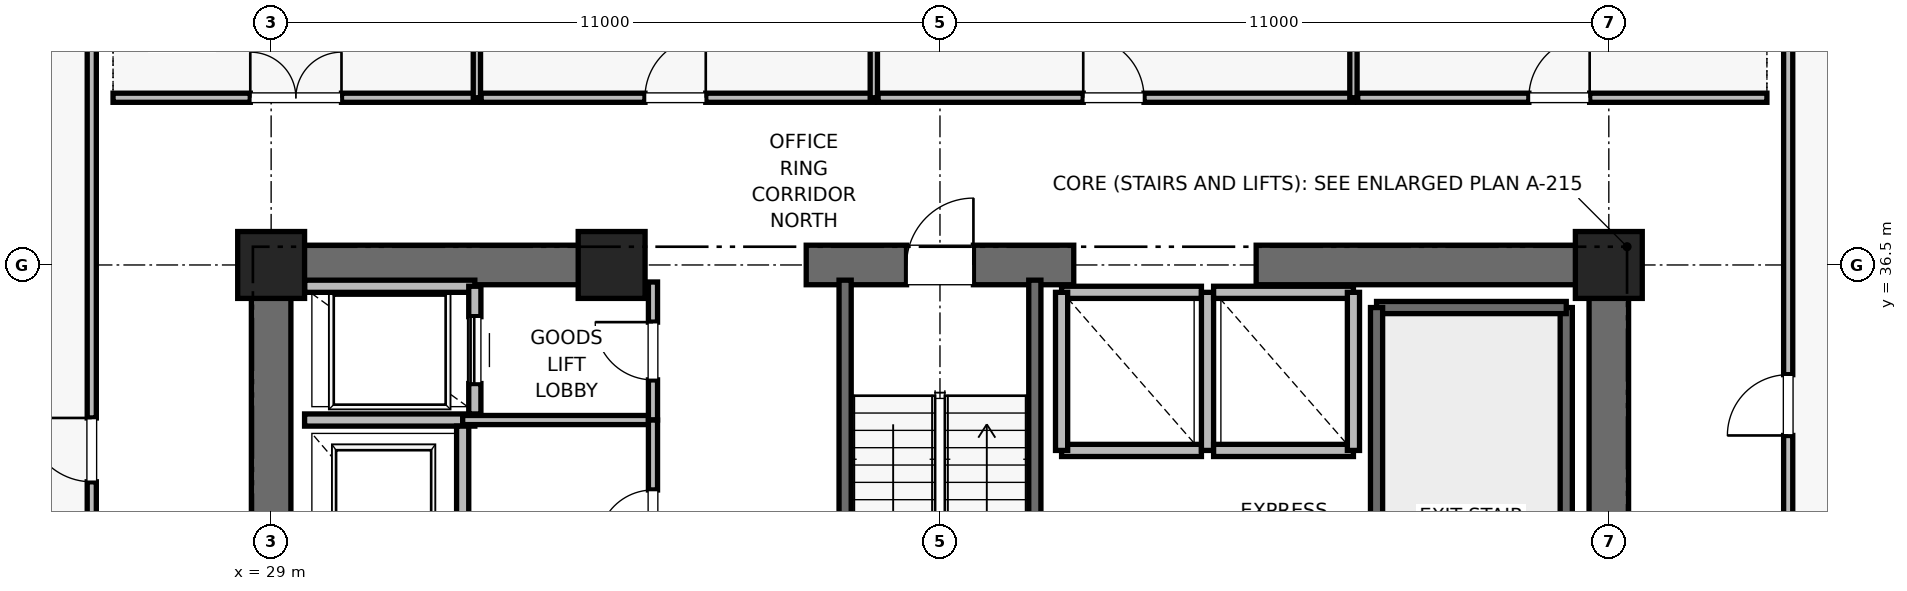
"""IFC4 building model, lengths in metres.
Left out: names, types, materials, properties, quantities, classifications, styles, units other than length and angle.
Written with IfcOpenShell. Run it as: python <this file> out.ifc"""

import sys

from ifc_helpers import new_model, si_unit, direction, frame, frame_2d, origin, origin_2d, place, context, subcontext, project, spatial, rectangle, extrude, element, fill, save


model = new_model("IFC4")
c1 = context("Model", 3, precision=1e-05, world=origin(), true_north=direction((0.0, 1.0)))
c2 = subcontext(c1, "Body", "Model", "MODEL_VIEW")
j1 = project(units=[si_unit("LENGTHUNIT", "METRE"), si_unit("PLANEANGLEUNIT", "RADIAN")], contexts=[c1])
p1 = place(None, origin())
s1 = spatial("IfcSite", under=j1, at=p1, CompositionType="ELEMENT")
p2 = place(p1, origin())
s2 = spatial("IfcBuilding", under=s1, at=p2, CompositionType="ELEMENT")
p3 = place(p2, frame((0.0, 0.0, 55.6)))
s3 = spatial("IfcBuildingStorey", under=s2, at=p3, CompositionType="ELEMENT", Elevation=55.6)
for number, where, z_axis, x_axis in (
    (1, (29.0, 36.5, 0.0), (0.0, 0.0, 1.0), (1.0, 0.0, 0.0)),
    (2, (51.0, 36.5, 0.0), (0.0, 0.0, 1.0), (1.0, 0.0, 0.0)),
    (3, (34.6, 36.5, 0.0), (0.0, 0.0, 1.0), (1.0, 0.0, 0.0)),
):
    element("IfcColumn", number, at=place(p3, frame(where, z_axis=z_axis, x_axis=x_axis)), inside=s3, PredefinedType="PILASTER", context=c2, shape_type="SweptSolid", body=[
        extrude(rectangle(XDim=1.1, YDim=1.1, at=origin_2d()), origin(), (0.0, 0.0, 1.0), 4.0),
    ])
p4 = place(p3, frame((29.0, 36.5, 0.0), z_axis=(0.0, 0.0, 1.0), x_axis=(1.0, 0.0, 0.0)))
e4 = element("IfcWall", 4, at=p4, inside=s3, PredefinedType="SHEAR", context=c2, shape_type="SweptSolid", body=[
    extrude(rectangle(XDim=5.8, YDim=0.65, at=frame_2d((2.9, 0.0))), origin(), (0.0, 0.0, 1.0), 3.76),
])
p5 = place(p3, frame((37.8, 36.5, 0.0), z_axis=(0.0, 0.0, 1.0), x_axis=(1.0, 0.0, 0.0)))
e5 = element("IfcWall", 5, at=p5, inside=s3, PredefinedType="SHEAR", context=c2, shape_type="SweptSolid", body=[
    extrude(rectangle(XDim=4.4, YDim=0.65, at=frame_2d((2.2, 0.0))), origin(), (0.0, 0.0, 1.0), 3.76),
])
p6 = place(p5, frame((1.65, 0.0, 0.0)))
e6 = element("IfcOpeningElement", 6, at=p6, cuts=e5, PredefinedType="OPENING", context=c2, shape_type="SweptSolid", body=[
    extrude(rectangle(XDim=1.1, YDim=2.15, at=frame_2d((0.55, 1.075))), frame((0.0, 0.325, 0.0), z_axis=(0.0, -1.0, 0.0), x_axis=(1.0, 0.0, 0.0)), (0.0, 0.0, 1.0), 0.65),
])
for number, where, z_axis, x_axis in (
    (7, (45.2, 36.5, 0.0), (0.0, 0.0, 1.0), (1.0, 0.0, 0.0)),
    (8, (29.0, 30.7, 0.0), (0.0, 0.0, 1.0), (0.0, 1.0, 0.0)),
):
    element("IfcWall", number, at=place(p3, frame(where, z_axis=z_axis, x_axis=x_axis)), inside=s3, PredefinedType="SHEAR", context=c2, shape_type="SweptSolid", body=[
        extrude(rectangle(XDim=5.8, YDim=0.65, at=frame_2d((2.9, 0.0))), origin(), (0.0, 0.0, 1.0), 3.76),
    ])
p7 = place(p3, frame((51.0, 27.7, 0.0), z_axis=(0.0, 0.0, 1.0), x_axis=(0.0, 1.0, 0.0)))
e9 = element("IfcWall", 9, at=p7, inside=s3, PredefinedType="SHEAR", context=c2, shape_type="SweptSolid", body=[
    extrude(rectangle(XDim=8.8, YDim=0.65, at=frame_2d((4.4, 0.0))), origin(), (0.0, 0.0, 1.0), 3.76),
])
p8 = place(p3, frame((50.3, 27.65, 0.0), z_axis=(0.0, 0.0, 1.0), x_axis=(0.0, 1.0, 0.0)))
e10 = element("IfcWall", 10, at=p8, inside=s3, PredefinedType="SOLIDWALL", context=c2, shape_type="SweptSolid", body=[
    extrude(rectangle(XDim=8.15, YDim=0.2, at=frame_2d((4.075, 0.0))), origin(), (0.0, 0.0, 1.0), 3.76),
])
p9 = place(p3, frame((47.18, 35.8, 0.0), z_axis=(0.0, 0.0, 1.0), x_axis=(1.0, 0.0, 0.0)))
e11 = element("IfcWall", 11, at=p9, inside=s3, PredefinedType="SOLIDWALL", context=c2, shape_type="SweptSolid", body=[
    extrude(rectangle(XDim=3.12, YDim=0.2, at=frame_2d((1.56, 0.0))), origin(), (0.0, 0.0, 1.0), 3.76),
])
p10 = place(p3, frame((47.18, 27.62, 0.0), z_axis=(0.0, 0.0, 1.0), x_axis=(0.0, 1.0, 0.0)))
e12 = element("IfcWall", 12, at=p10, inside=s3, PredefinedType="SOLIDWALL", context=c2, shape_type="SweptSolid", body=[
    extrude(rectangle(XDim=8.18, YDim=0.2, at=frame_2d((4.09, 0.0))), origin(), (0.0, 0.0, 1.0), 3.76),
])
p11 = place(p3, frame((38.44, 27.38, 0.0), z_axis=(0.0, 0.0, 1.0), x_axis=(0.0, 1.0, 0.0)))
e13 = element("IfcWall", 13, at=p11, inside=s3, PredefinedType="SOLIDWALL", context=c2, shape_type="SweptSolid", body=[
    extrude(rectangle(XDim=8.87, YDim=0.2, at=frame_2d((4.435, 0.0))), origin(), (0.0, 0.0, 1.0), 3.76),
])
p12 = place(p3, frame((41.56, 27.68, 0.0), z_axis=(0.0, 0.0, 1.0), x_axis=(0.0, 1.0, 0.0)))
e14 = element("IfcWall", 14, at=p12, inside=s3, PredefinedType="SOLIDWALL", context=c2, shape_type="SweptSolid", body=[
    extrude(rectangle(XDim=8.57, YDim=0.2, at=frame_2d((4.285, 0.0))), origin(), (0.0, 0.0, 1.0), 3.76),
])
p13 = place(p3, frame((29.55, 33.95, 0.0), z_axis=(0.0, 0.0, 1.0), x_axis=(1.0, 0.0, 0.0)))
e15 = element("IfcWall", 15, at=p13, inside=s3, PredefinedType="SOLIDWALL", context=c2, shape_type="SweptSolid", body=[
    extrude(rectangle(XDim=2.8, YDim=0.2, at=frame_2d((1.4, 0.0))), origin(), (0.0, 0.0, 1.0), 3.76),
])
p14 = place(p3, frame((32.15, 30.85, 0.0), z_axis=(0.0, 0.0, 1.0), x_axis=(0.0, 1.0, 0.0)))
e16 = element("IfcWall", 16, at=p14, inside=s3, PredefinedType="SOLIDWALL", context=c2, shape_type="SweptSolid", body=[
    extrude(rectangle(XDim=3.0, YDim=0.2, at=frame_2d((1.5, 0.0))), origin(), (0.0, 0.0, 1.0), 3.76),
])
p15 = place(p3, frame((32.35, 36.15, 0.0), z_axis=(0.0, 0.0, 1.0), x_axis=(-1.0, 0.0, 0.0)))
e17 = element("IfcWall", 17, at=p15, inside=s3, PredefinedType="SOLIDWALL", context=c2, shape_type="SweptSolid", body=[
    extrude(rectangle(XDim=2.8, YDim=0.2, at=frame_2d((1.4, 0.0))), origin(), (0.0, 0.0, 1.0), 2.889),
])
p16 = place(p3, frame((32.35, 34.05, 0.0), z_axis=(0.0, 0.0, 1.0), x_axis=(0.0, 1.0, 0.0)))
e18 = element("IfcWall", 18, at=p16, inside=s3, PredefinedType="SOLIDWALL", context=c2, shape_type="SweptSolid", body=[
    extrude(rectangle(XDim=2.1, YDim=0.2, at=frame_2d((1.05, 0.0))), origin(), (0.0, 0.0, 1.0), 3.76),
])
p17 = place(p16, frame((0.5, 0.0, 0.0)))
e19 = element("IfcOpeningElement", 19, at=p17, cuts=e18, PredefinedType="OPENING", context=c2, shape_type="SweptSolid", body=[
    extrude(rectangle(XDim=1.1, YDim=2.2, at=frame_2d((0.55, 1.1))), frame((0.0, 0.1, 0.0), z_axis=(0.0, -1.0, 0.0), x_axis=(1.0, 0.0, 0.0)), (0.0, 0.0, 1.0), 0.2),
])
p18 = place(p3, frame((42.0, 33.45, 0.0), z_axis=(0.0, 0.0, 1.0), x_axis=(1.0, 0.0, 0.0)))
e20 = element("IfcWall", 20, at=p18, inside=s3, PredefinedType="SOLIDWALL", context=c2, shape_type="SweptSolid", body=[
    extrude(rectangle(XDim=2.3, YDim=0.2, at=frame_2d((1.15, 0.0))), origin(), (0.0, 0.0, 1.0), 3.76),
])
p19 = place(p3, frame((44.3, 36.05, 0.0), z_axis=(0.0, 0.0, 1.0), x_axis=(-1.0, 0.0, 0.0)))
e21 = element("IfcWall", 21, at=p19, inside=s3, PredefinedType="SOLIDWALL", context=c2, shape_type="SweptSolid", body=[
    extrude(rectangle(XDim=2.3, YDim=0.2, at=frame_2d((1.15, 0.0))), origin(), (0.0, 0.0, 1.0), 2.54),
])
for number, where, z_axis, x_axis in (
    (22, (42.0, 36.05, 0.0), (0.0, 0.0, 1.0), (0.0, -1.0, 0.0)),
    (23, (44.4, 33.45, 0.0), (0.0, 0.0, 1.0), (0.0, 1.0, 0.0)),
):
    element("IfcWall", number, at=place(p3, frame(where, z_axis=z_axis, x_axis=x_axis)), inside=s3, PredefinedType="SOLIDWALL", context=c2, shape_type="SweptSolid", body=[
        extrude(rectangle(XDim=2.6, YDim=0.2, at=frame_2d((1.3, 0.0))), origin(), (0.0, 0.0, 1.0), 2.54),
    ])
p20 = place(p3, frame((44.5, 33.45, 0.0), z_axis=(0.0, 0.0, 1.0), x_axis=(1.0, 0.0, 0.0)))
e24 = element("IfcWall", 24, at=p20, inside=s3, PredefinedType="SOLIDWALL", context=c2, shape_type="SweptSolid", body=[
    extrude(rectangle(XDim=2.3, YDim=0.2, at=frame_2d((1.15, 0.0))), origin(), (0.0, 0.0, 1.0), 3.76),
])
p21 = place(p3, frame((46.8, 36.05, 0.0), z_axis=(0.0, 0.0, 1.0), x_axis=(-1.0, 0.0, 0.0)))
e25 = element("IfcWall", 25, at=p21, inside=s3, PredefinedType="SOLIDWALL", context=c2, shape_type="SweptSolid", body=[
    extrude(rectangle(XDim=2.3, YDim=0.2, at=frame_2d((1.15, 0.0))), origin(), (0.0, 0.0, 1.0), 2.54),
])
p22 = place(p3, frame((46.8, 33.45, 0.0), z_axis=(0.0, 0.0, 1.0), x_axis=(0.0, 1.0, 0.0)))
e26 = element("IfcWall", 26, at=p22, inside=s3, PredefinedType="SOLIDWALL", context=c2, shape_type="SweptSolid", body=[
    extrude(rectangle(XDim=2.6, YDim=0.2, at=frame_2d((1.3, 0.0))), origin(), (0.0, 0.0, 1.0), 3.76),
])
p23 = place(p3, frame((32.15, 33.95, 0.0), z_axis=(0.0, 0.0, 1.0), x_axis=(1.0, 0.0, 0.0)))
e27 = element("IfcWall", 27, at=p23, inside=s3, PredefinedType="PARTITIONING", context=c2, shape_type="SweptSolid", body=[
    extrude(rectangle(XDim=3.13, YDim=0.15, at=frame_2d((1.565, 0.0))), origin(), (0.0, 0.0, 1.0), 2.85),
])
p24 = place(p3, frame((35.28, 33.95, 0.0), z_axis=(0.0, 0.0, 1.0), x_axis=(0.0, 1.0, 0.0)))
e28 = element("IfcWall", 28, at=p24, inside=s3, PredefinedType="PARTITIONING", context=c2, shape_type="SweptSolid", body=[
    extrude(rectangle(XDim=2.27, YDim=0.15, at=frame_2d((1.135, 0.0))), origin(), (0.0, 0.0, 1.0), 2.54),
])
p25 = place(p24, frame((0.66, 0.0, 0.0)))
e29 = element("IfcOpeningElement", 29, at=p25, cuts=e28, PredefinedType="OPENING", context=c2, shape_type="SweptSolid", body=[
    extrude(rectangle(XDim=0.95, YDim=2.15, at=frame_2d((0.475, 1.075))), frame((0.0, 0.075, 0.0), z_axis=(0.0, -1.0, 0.0), x_axis=(1.0, 0.0, 0.0)), (0.0, 0.0, 1.0), 0.15),
])
p26 = place(p3, frame((35.28, 30.75, 0.0), z_axis=(0.0, 0.0, 1.0), x_axis=(0.0, 1.0, 0.0)))
e30 = element("IfcWall", 30, at=p26, inside=s3, PredefinedType="PARTITIONING", context=c2, shape_type="SweptSolid", body=[
    extrude(rectangle(XDim=3.2, YDim=0.15, at=frame_2d((1.6, 0.0))), origin(), (0.0, 0.0, 1.0), 2.85),
])
p27 = place(p26, frame((1.15, 0.0, 0.0)))
e31 = element("IfcOpeningElement", 31, at=p27, cuts=e30, PredefinedType="OPENING", context=c2, shape_type="SweptSolid", body=[
    extrude(rectangle(XDim=0.9, YDim=2.1, at=frame_2d((0.45, 1.05))), frame((0.0, 0.075, 0.0), z_axis=(0.0, -1.0, 0.0), x_axis=(1.0, 0.0, 0.0)), (0.0, 0.0, 1.0), 0.15),
])
p28 = place(p3, frame((26.4, 39.25, 0.0), z_axis=(0.0, 0.0, 1.0), x_axis=(1.0, 0.0, 0.0)))
e32 = element("IfcWall", 32, at=p28, inside=s3, PredefinedType="PARTITIONING", context=c2, shape_type="SweptSolid", body=[
    extrude(rectangle(XDim=5.984, YDim=0.15, at=frame_2d((2.992, 0.0))), origin(), (0.0, 0.0, 1.0), 2.85),
])
p29 = place(p28, frame((2.257, 0.0, 0.0)))
e33 = element("IfcOpeningElement", 33, at=p29, cuts=e32, PredefinedType="OPENING", context=c2, shape_type="SweptSolid", body=[
    extrude(rectangle(XDim=1.5, YDim=2.25, at=frame_2d((0.75, 1.125))), frame((0.0, 0.075, 0.0), z_axis=(0.0, -1.0, 0.0), x_axis=(1.0, 0.0, 0.0)), (0.0, 0.0, 1.0), 0.15),
])
p30 = place(p3, frame((32.384, 39.25, 0.0), z_axis=(0.0, 0.0, 1.0), x_axis=(0.0, 1.0, 0.0)))
e34 = element("IfcWall", 34, at=p30, inside=s3, PredefinedType="PARTITIONING", context=c2, shape_type="SweptSolid", body=[
    extrude(rectangle(XDim=10.377, YDim=0.12, at=frame_2d((5.188, 0.0))), origin(), (0.0, 0.0, 1.0), 2.39),
])
p31 = place(p3, frame((32.454, 39.25, 0.0), z_axis=(0.0, 0.0, 1.0), x_axis=(1.0, 0.0, 0.0)))
e35 = element("IfcWall", 35, at=p31, inside=s3, PredefinedType="PARTITIONING", context=c2, shape_type="SweptSolid", body=[
    extrude(rectangle(XDim=6.458, YDim=0.15, at=frame_2d((3.229, 0.0))), origin(), (0.0, 0.0, 1.0), 2.85),
])
p32 = place(p31, frame((2.694, 0.0, 0.0)))
e36 = element("IfcOpeningElement", 36, at=p32, cuts=e35, PredefinedType="OPENING", context=c2, shape_type="SweptSolid", body=[
    extrude(rectangle(XDim=1.0, YDim=2.15, at=frame_2d((0.5, 1.075))), frame((0.0, 0.075, 0.0), z_axis=(0.0, -1.0, 0.0), x_axis=(1.0, 0.0, 0.0)), (0.0, 0.0, 1.0), 0.15),
])
p33 = place(p3, frame((38.912, 39.25, 0.0), z_axis=(0.0, 0.0, 1.0), x_axis=(0.0, 1.0, 0.0)))
e37 = element("IfcWall", 37, at=p33, inside=s3, PredefinedType="PARTITIONING", context=c2, shape_type="SweptSolid", body=[
    extrude(rectangle(XDim=10.377, YDim=0.12, at=frame_2d((5.188, 0.0))), origin(), (0.0, 0.0, 1.0), 2.39),
])
p34 = place(p3, frame((38.982, 39.25, 0.0), z_axis=(0.0, 0.0, 1.0), x_axis=(1.0, 0.0, 0.0)))
e38 = element("IfcWall", 38, at=p34, inside=s3, PredefinedType="PARTITIONING", context=c2, shape_type="SweptSolid", body=[
    extrude(rectangle(XDim=7.818, YDim=0.15, at=frame_2d((3.909, 0.0))), origin(), (0.0, 0.0, 1.0), 2.85),
])
p35 = place(p34, frame((3.374, 0.0, 0.0)))
e39 = element("IfcOpeningElement", 39, at=p35, cuts=e38, PredefinedType="OPENING", context=c2, shape_type="SweptSolid", body=[
    extrude(rectangle(XDim=1.0, YDim=2.15, at=frame_2d((0.5, 1.075))), frame((0.0, 0.075, 0.0), z_axis=(0.0, -1.0, 0.0), x_axis=(1.0, 0.0, 0.0)), (0.0, 0.0, 1.0), 0.15),
])
p36 = place(p3, frame((46.8, 39.25, 0.0), z_axis=(0.0, 0.0, 1.0), x_axis=(0.0, 1.0, 0.0)))
e40 = element("IfcWall", 40, at=p36, inside=s3, PredefinedType="PARTITIONING", context=c2, shape_type="SweptSolid", body=[
    extrude(rectangle(XDim=10.377, YDim=0.12, at=frame_2d((5.188, 0.0))), origin(), (0.0, 0.0, 1.0), 2.39),
])
p37 = place(p3, frame((46.87, 39.25, 0.0), z_axis=(0.0, 0.0, 1.0), x_axis=(1.0, 0.0, 0.0)))
e41 = element("IfcWall", 41, at=p37, inside=s3, PredefinedType="PARTITIONING", context=c2, shape_type="SweptSolid", body=[
    extrude(rectangle(XDim=6.73, YDim=0.15, at=frame_2d((3.365, 0.0))), origin(), (0.0, 0.0, 1.0), 2.85),
])
p38 = place(p37, frame((2.815, 0.0, 0.0)))
e42 = element("IfcOpeningElement", 42, at=p38, cuts=e41, PredefinedType="OPENING", context=c2, shape_type="SweptSolid", body=[
    extrude(rectangle(XDim=1.0, YDim=2.15, at=frame_2d((0.5, 1.075))), frame((0.0, 0.075, 0.0), z_axis=(0.0, -1.0, 0.0), x_axis=(1.0, 0.0, 0.0)), (0.0, 0.0, 1.0), 0.15),
])
p39 = place(p3, frame((26.05, 30.518, 0.0), z_axis=(0.0, 0.0, 1.0), x_axis=(0.0, 1.0, 0.0)))
e43 = element("IfcWall", 43, at=p39, inside=s3, PredefinedType="PARTITIONING", context=c2, shape_type="SweptSolid", body=[
    extrude(rectangle(XDim=15.409, YDim=0.15, at=frame_2d((7.705, 0.0))), origin(), (0.0, 0.0, 1.0), 2.85),
])
p40 = place(p39, frame((2.416, 0.0, 0.0)))
e44 = element("IfcOpeningElement", 44, at=p40, cuts=e43, PredefinedType="OPENING", context=c2, shape_type="SweptSolid", body=[
    extrude(rectangle(XDim=1.05, YDim=2.2, at=frame_2d((0.525, 1.1))), frame((0.0, 0.075, 0.0), z_axis=(0.0, -1.0, 0.0), x_axis=(1.0, 0.0, 0.0)), (0.0, 0.0, 1.0), 0.15),
])
p41 = place(p3, frame((53.95, 31.992, 0.0), z_axis=(0.0, 0.0, 1.0), x_axis=(0.0, 1.0, 0.0)))
e45 = element("IfcWall", 45, at=p41, inside=s3, PredefinedType="PARTITIONING", context=c2, shape_type="SweptSolid", body=[
    extrude(rectangle(XDim=13.935, YDim=0.15, at=frame_2d((6.967, 0.0))), origin(), (0.0, 0.0, 1.0), 2.85),
])
p42 = place(p41, frame((1.704, 0.0, 0.0)))
e46 = element("IfcOpeningElement", 46, at=p42, cuts=e45, PredefinedType="OPENING", context=c2, shape_type="SweptSolid", body=[
    extrude(rectangle(XDim=1.0, YDim=2.15, at=frame_2d((0.5, 1.075))), frame((0.0, 0.075, 0.0), z_axis=(0.0, -1.0, 0.0), x_axis=(1.0, 0.0, 0.0)), (0.0, 0.0, 1.0), 0.15),
])
p43 = place(p6, origin())
e47 = element("IfcDoor", 47, at=p43, inside=s3, OperationType="SINGLE_SWING_RIGHT", PredefinedType="DOOR", context=c2, shape_type="SweptSolid", body=[
    extrude(rectangle(XDim=1.1, YDim=2.15, at=frame_2d((0.55, 1.075))), frame((0.0, 0.025, 0.0), z_axis=(0.0, -1.0, 0.0), x_axis=(1.0, 0.0, 0.0)), (0.0, 0.0, 1.0), 0.05),
])
fill(e6, e47)
p44 = place(p17, origin())
e48 = element("IfcDoor", 48, at=p44, inside=s3, OperationType="SLIDING_TO_RIGHT", PredefinedType="DOOR", context=c2, shape_type="SweptSolid", body=[
    extrude(rectangle(XDim=1.1, YDim=2.2, at=frame_2d((0.55, 1.1))), frame((0.0, 0.025, 0.0), z_axis=(0.0, -1.0, 0.0), x_axis=(1.0, 0.0, 0.0)), (0.0, 0.0, 1.0), 0.05),
])
fill(e19, e48)
p45 = place(p25, origin())
e49 = element("IfcDoor", 49, at=p45, inside=s3, OperationType="SINGLE_SWING_RIGHT", PredefinedType="DOOR", context=c2, shape_type="SweptSolid", body=[
    extrude(rectangle(XDim=0.95, YDim=2.15, at=frame_2d((0.475, 1.075))), frame((0.0, 0.025, 0.0), z_axis=(0.0, -1.0, 0.0), x_axis=(1.0, 0.0, 0.0)), (0.0, 0.0, 1.0), 0.05),
])
fill(e29, e49)
p46 = place(p27, origin())
e50 = element("IfcDoor", 50, at=p46, inside=s3, OperationType="SINGLE_SWING_LEFT", PredefinedType="DOOR", context=c2, shape_type="SweptSolid", body=[
    extrude(rectangle(XDim=0.9, YDim=2.1, at=frame_2d((0.45, 1.05))), frame((0.0, 0.025, 0.0), z_axis=(0.0, -1.0, 0.0), x_axis=(1.0, 0.0, 0.0)), (0.0, 0.0, 1.0), 0.05),
])
fill(e31, e50)
p47 = place(p29, origin())
e51 = element("IfcDoor", 51, at=p47, inside=s3, OperationType="DOUBLE_DOOR_SINGLE_SWING", PredefinedType="DOOR", context=c2, shape_type="SweptSolid", body=[
    extrude(rectangle(XDim=1.5, YDim=2.25, at=frame_2d((0.75, 1.125))), frame((0.0, 0.025, 0.0), z_axis=(0.0, -1.0, 0.0), x_axis=(1.0, 0.0, 0.0)), (0.0, 0.0, 1.0), 0.05),
])
fill(e33, e51)
p48 = place(p32, origin())
e52 = element("IfcDoor", 52, at=p48, inside=s3, OperationType="SINGLE_SWING_RIGHT", PredefinedType="DOOR", context=c2, shape_type="SweptSolid", body=[
    extrude(rectangle(XDim=1.0, YDim=2.15, at=frame_2d((0.5, 1.075))), frame((0.0, 0.025, 0.0), z_axis=(0.0, -1.0, 0.0), x_axis=(1.0, 0.0, 0.0)), (0.0, 0.0, 1.0), 0.05),
])
fill(e36, e52)
p49 = place(p35, origin())
e53 = element("IfcDoor", 53, at=p49, inside=s3, OperationType="SINGLE_SWING_LEFT", PredefinedType="DOOR", context=c2, shape_type="SweptSolid", body=[
    extrude(rectangle(XDim=1.0, YDim=2.15, at=frame_2d((0.5, 1.075))), frame((0.0, 0.025, 0.0), z_axis=(0.0, -1.0, 0.0), x_axis=(1.0, 0.0, 0.0)), (0.0, 0.0, 1.0), 0.05),
])
fill(e39, e53)
p50 = place(p38, origin())
e54 = element("IfcDoor", 54, at=p50, inside=s3, OperationType="SINGLE_SWING_RIGHT", PredefinedType="DOOR", context=c2, shape_type="SweptSolid", body=[
    extrude(rectangle(XDim=1.0, YDim=2.15, at=frame_2d((0.5, 1.075))), frame((0.0, 0.025, 0.0), z_axis=(0.0, -1.0, 0.0), x_axis=(1.0, 0.0, 0.0)), (0.0, 0.0, 1.0), 0.05),
])
fill(e42, e54)
p51 = place(p40, origin())
e55 = element("IfcDoor", 55, at=p51, inside=s3, OperationType="SINGLE_SWING_RIGHT", PredefinedType="DOOR", context=c2, shape_type="SweptSolid", body=[
    extrude(rectangle(XDim=1.05, YDim=2.2, at=frame_2d((0.525, 1.1))), frame((0.0, 0.025, 0.0), z_axis=(0.0, -1.0, 0.0), x_axis=(1.0, 0.0, 0.0)), (0.0, 0.0, 1.0), 0.05),
])
fill(e44, e55)
p52 = place(p42, origin())
e56 = element("IfcDoor", 56, at=p52, inside=s3, OperationType="SINGLE_SWING_LEFT", PredefinedType="DOOR", context=c2, shape_type="SweptSolid", body=[
    extrude(rectangle(XDim=1.0, YDim=2.15, at=frame_2d((0.5, 1.075))), frame((0.0, 0.025, 0.0), z_axis=(0.0, -1.0, 0.0), x_axis=(1.0, 0.0, 0.0)), (0.0, 0.0, 1.0), 0.05),
])
fill(e46, e56)
save(model, sys.argv[1])
